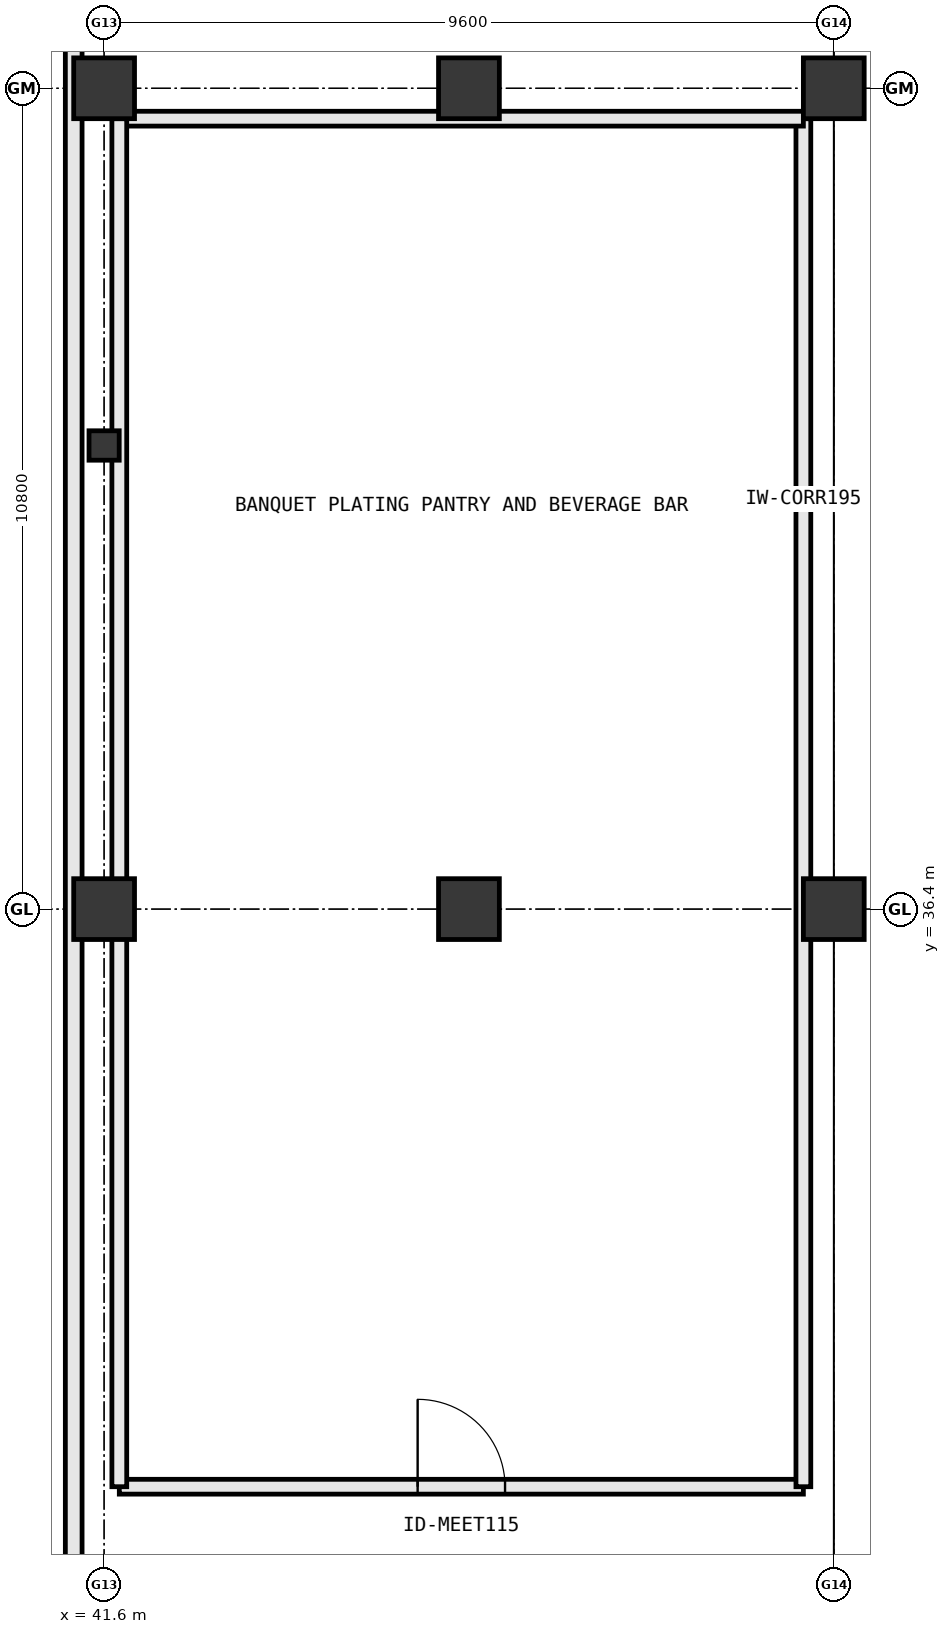
"""IFC4 building model, lengths in metres.
Left out: names, types, materials, properties, quantities, classifications, styles, units other than length and angle.
Written with IfcOpenShell. Run it as: python <this file> out.ifc"""

import sys

from ifc_helpers import new_model, si_unit, direction, frame, frame_2d, origin, origin_2d, place, context, subcontext, project, spatial, rectangle, i_section, extrude, element, fill, save


model = new_model("IFC4")
c1 = context("Model", 3, precision=1e-05, world=origin(), true_north=direction((0.0, 1.0)))
c2 = subcontext(c1, "Body", "Model", "MODEL_VIEW")
j1 = project(units=[si_unit("LENGTHUNIT", "METRE"), si_unit("PLANEANGLEUNIT", "RADIAN")], contexts=[c1])
p1 = place(None, origin())
s1 = spatial("IfcSite", under=j1, at=p1, CompositionType="ELEMENT")
p2 = place(p1, origin())
s2 = spatial("IfcBuilding", under=s1, at=p2, CompositionType="ELEMENT")
p3 = place(p2, origin())
s3 = spatial("IfcBuildingStorey", under=s2, at=p3, CompositionType="ELEMENT", Elevation=0.0)
p4 = place(p3, frame((41.6, 36.4, 0.0), z_axis=(0.0, 0.0, 1.0), x_axis=(1.0, 0.0, 0.0)))
e1 = element("IfcColumn", 1, at=p4, inside=s3, PredefinedType="COLUMN", context=c2, shape_type="SweptSolid", body=[
    extrude(rectangle(XDim=0.8, YDim=0.8, at=origin_2d()), origin(), (0.0, 0.0, 1.0), 5.4),
])
p5 = place(p3, frame((41.6, 42.5, 0.0), z_axis=(0.0, 0.0, 1.0), x_axis=(1.0, 0.0, 0.0)))
e2 = element("IfcColumn", 2, at=p5, inside=s3, PredefinedType="COLUMN", context=c2, shape_type="SweptSolid", body=[
    extrude(i_section(OverallWidth=0.397, OverallDepth=0.387, WebThickness=0.021, FlangeThickness=0.033, at=origin_2d()), origin(), (0.0, 0.0, 1.0), 5.4),
])
for number, where, z_axis, x_axis in (
    (3, (41.6, 47.2, 0.0), (0.0, 0.0, 1.0), (1.0, 0.0, 0.0)),
    (4, (46.4, 36.4, 0.0), (0.0, 0.0, 1.0), (1.0, 0.0, 0.0)),
    (5, (46.4, 47.2, 0.0), (0.0, 0.0, 1.0), (1.0, 0.0, 0.0)),
    (6, (51.2, 36.4, 0.0), (0.0, 0.0, 1.0), (1.0, 0.0, 0.0)),
    (7, (51.2, 47.2, 0.0), (0.0, 0.0, 1.0), (1.0, 0.0, 0.0)),
):
    element("IfcColumn", number, at=place(p3, frame(where, z_axis=z_axis, x_axis=x_axis)), inside=s3, PredefinedType="COLUMN", context=c2, shape_type="SweptSolid", body=[
        extrude(rectangle(XDim=0.8, YDim=0.8, at=origin_2d()), origin(), (0.0, 0.0, 1.0), 5.4),
    ])
p6 = place(p3, frame((41.2, 27.4, 0.0), z_axis=(0.0, 0.0, 1.0), x_axis=(0.0, 1.0, 0.0)))
e8 = element("IfcWall", 8, at=p6, inside=s3, PredefinedType="STANDARD", context=c2, shape_type="SweptSolid", body=[
    extrude(rectangle(XDim=30.0, YDim=0.22, at=frame_2d((15.0, 0.0))), origin(), (0.0, 0.0, 1.0), 4.422),
])
p7 = place(p3, frame((41.8, 28.8, 0.0), z_axis=(0.0, 0.0, 1.0), x_axis=(1.0, 0.0, 0.0)))
e9 = element("IfcWall", 9, at=p7, inside=s3, PredefinedType="PARTITIONING", context=c2, shape_type="SweptSolid", body=[
    extrude(rectangle(XDim=9.0, YDim=0.195, at=frame_2d((4.5, 0.0))), origin(), (0.0, 0.0, 1.0), 5.12),
])
p8 = place(p7, frame((3.925, 0.0, 0.0)))
e10 = element("IfcOpeningElement", 10, at=p8, cuts=e9, PredefinedType="OPENING", context=c2, shape_type="SweptSolid", body=[
    extrude(rectangle(XDim=1.15, YDim=2.2, at=frame_2d((0.575, 1.1))), frame((0.0, 0.11, 0.0), z_axis=(0.0, -1.0, 0.0), x_axis=(1.0, 0.0, 0.0)), (0.0, 0.0, 1.0), 0.219),
])
p9 = place(p3, frame((50.8, 28.8, 0.0), z_axis=(0.0, 0.0, 1.0), x_axis=(0.0, 1.0, 0.0)))
e11 = element("IfcWall", 11, at=p9, inside=s3, PredefinedType="PARTITIONING", context=c2, shape_type="SweptSolid", body=[
    extrude(rectangle(XDim=18.0, YDim=0.195, at=frame_2d((9.0, 0.0))), origin(), (0.0, 0.0, 1.0), 4.475),
])
p10 = place(p3, frame((50.8, 46.8, 0.0), z_axis=(0.0, 0.0, 1.0), x_axis=(-1.0, 0.0, 0.0)))
e12 = element("IfcWall", 12, at=p10, inside=s3, PredefinedType="PARTITIONING", context=c2, shape_type="SweptSolid", body=[
    extrude(rectangle(XDim=9.0, YDim=0.195, at=frame_2d((4.5, 0.0))), origin(), (0.0, 0.0, 1.0), 4.503),
])
p11 = place(p3, frame((41.8, 46.8, 0.0), z_axis=(0.0, 0.0, 1.0), x_axis=(0.0, -1.0, 0.0)))
e13 = element("IfcWall", 13, at=p11, inside=s3, PredefinedType="PARTITIONING", context=c2, shape_type="SweptSolid", body=[
    extrude(rectangle(XDim=18.0, YDim=0.195, at=frame_2d((9.0, 0.0))), origin(), (0.0, 0.0, 1.0), 4.498),
])
p12 = place(p8, origin())
e14 = element("IfcDoor", 14, at=p12, inside=s3, OperationType="SINGLE_SWING_LEFT", PredefinedType="DOOR", context=c2, shape_type="SweptSolid", body=[
    extrude(rectangle(XDim=1.15, YDim=2.2, at=frame_2d((0.575, 1.1))), frame((0.0, 0.025, 0.0), z_axis=(0.0, -1.0, 0.0), x_axis=(1.0, 0.0, 0.0)), (0.0, 0.0, 1.0), 0.05),
])
fill(e10, e14)
save(model, sys.argv[1])
